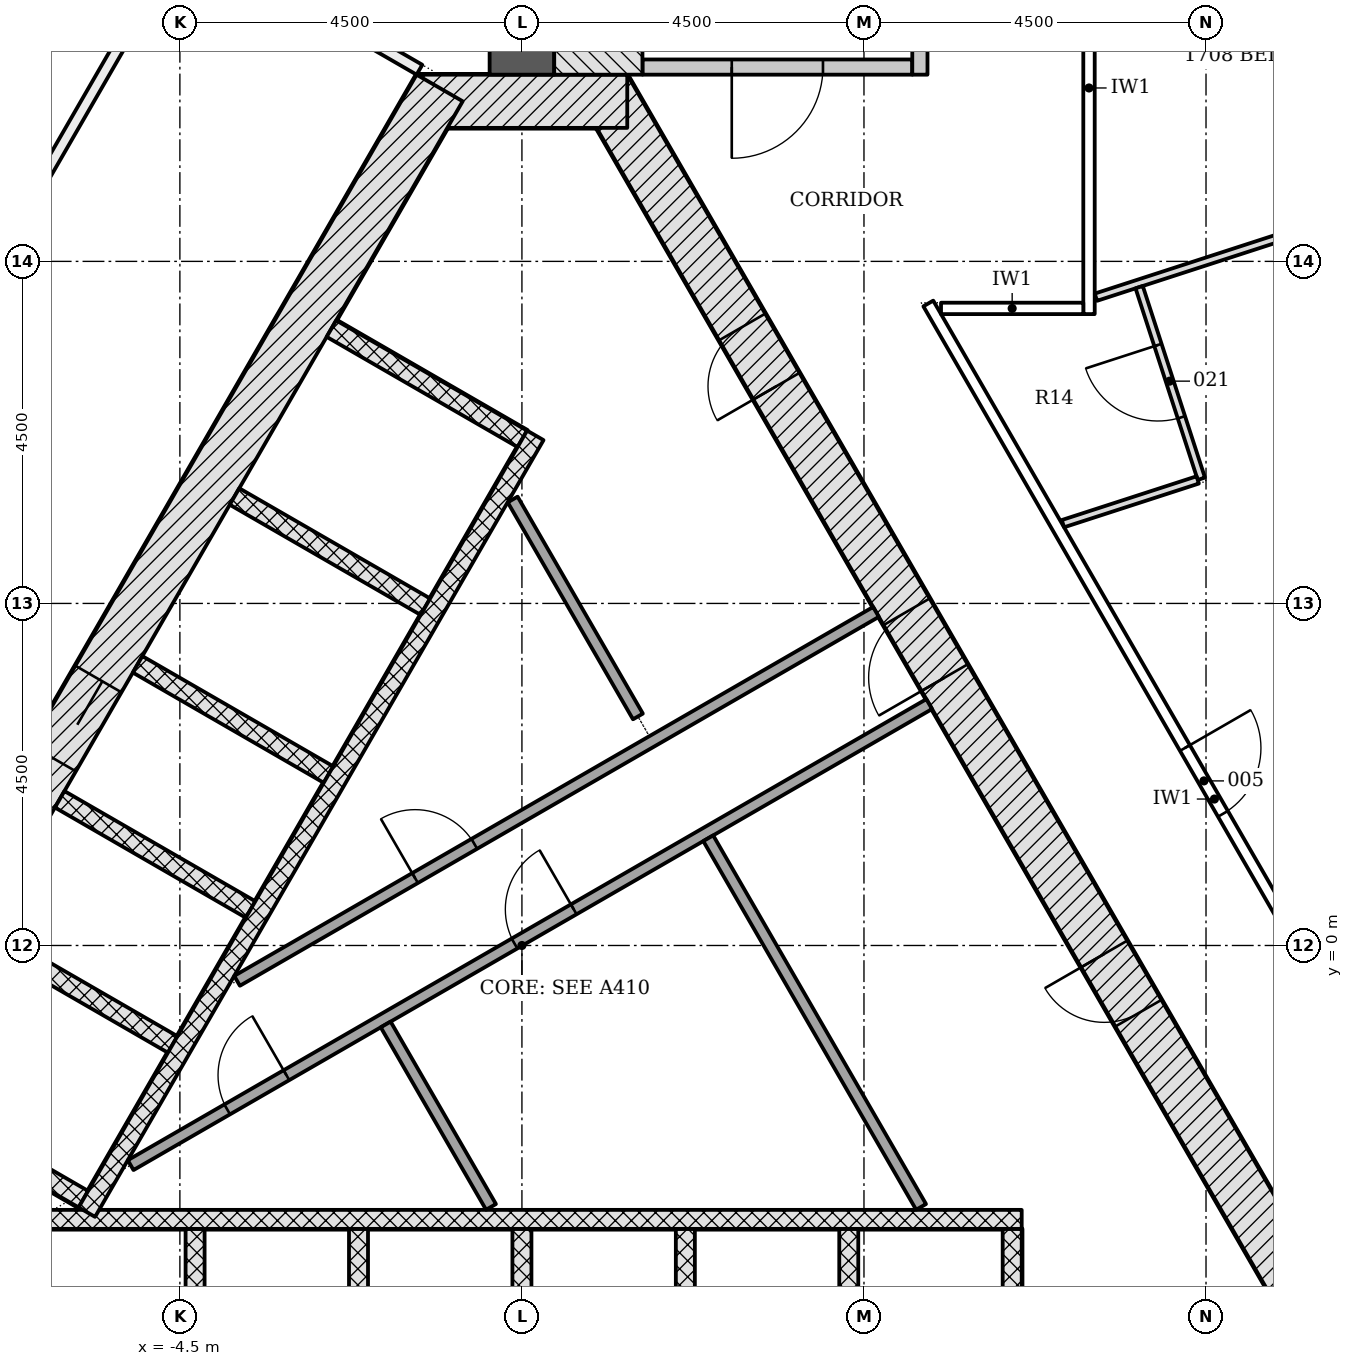
"""IFC4 building model, lengths in metres.
Left out: names, types, materials, properties, quantities, classifications, styles, units other than length and angle.
Written with IfcOpenShell. Run it as: python <this file> out.ifc"""

import sys

from ifc_helpers import new_model, si_unit, direction, frame, frame_2d, origin, place, context, subcontext, project, spatial, rectangle, extrude, element, fill, save


model = new_model("IFC4")
c1 = context("Model", 3, precision=1e-05, world=origin(), true_north=direction((0.0, 1.0)))
c2 = subcontext(c1, "Body", "Model", "MODEL_VIEW")
j1 = project(units=[si_unit("LENGTHUNIT", "METRE"), si_unit("PLANEANGLEUNIT", "RADIAN")], contexts=[c1])
p1 = place(None, origin())
s1 = spatial("IfcSite", under=j1, at=p1, CompositionType="ELEMENT")
p2 = place(p1, origin())
s2 = spatial("IfcBuilding", under=s1, at=p2, CompositionType="ELEMENT")
p3 = place(p2, frame((0.0, 0.0, 69.0)))
s3 = spatial("IfcBuildingStorey", under=s2, at=p3, CompositionType="ELEMENT", Elevation=69.0)
p4 = place(p3, frame((8.926, -6.753, -0.2), z_axis=(0.0, 0.0, 1.0), x_axis=(0.500042739161, 0.866000726912, 0.0)))
e1 = element("IfcWall", 1, at=p4, inside=s3, PredefinedType="SHEAR", context=c2, shape_type="SweptSolid", body=[
    extrude(rectangle(XDim=2.771, YDim=0.7, at=frame_2d((1.386, 0.0))), origin(), (0.0, 0.0, 1.0), 3.6),
])
p5 = place(p3, frame((10.311, -4.703, -0.2), z_axis=(0.0, 0.0, 1.0), x_axis=(-0.500001446645, 0.866024568562, 0.0)))
e2 = element("IfcWall", 2, at=p5, inside=s3, PredefinedType="SHEAR", context=c2, shape_type="SweptSolid", body=[
    extrude(rectangle(XDim=18.458, YDim=0.7, at=frame_2d((9.229, 0.0))), origin(), (0.0, 0.0, 1.0), 3.6),
])
p6 = place(p5, frame((9.5, 0.0, 0.2)))
e3 = element("IfcOpeningElement", 3, at=p6, cuts=e2, PredefinedType="OPENING", context=c2, shape_type="SweptSolid", body=[
    extrude(rectangle(XDim=1.0, YDim=2.1, at=frame_2d((0.5, 1.05))), frame((0.0, 0.36, 0.0), z_axis=(0.0, -1.0, 0.0), x_axis=(1.0, 0.0, 0.0)), (0.0, 0.0, 1.0), 0.72),
])
p7 = place(p5, frame((4.402, 0.0, 0.2)))
e4 = element("IfcOpeningElement", 4, at=p7, cuts=e2, PredefinedType="OPENING", context=c2, shape_type="SweptSolid", body=[
    extrude(rectangle(XDim=0.9, YDim=2.1, at=frame_2d((0.45, 1.05))), frame((0.0, 0.36, 0.0), z_axis=(0.0, -1.0, 0.0), x_axis=(1.0, 0.0, 0.0)), (0.0, 0.0, 1.0), 0.72),
])
p8 = place(p5, frame((13.927, 0.0, 0.2)))
e5 = element("IfcOpeningElement", 5, at=p8, cuts=e2, PredefinedType="OPENING", context=c2, shape_type="SweptSolid", body=[
    extrude(rectangle(XDim=0.9, YDim=2.1, at=frame_2d((0.45, 1.05))), frame((0.0, 0.36, 0.0), z_axis=(0.0, -1.0, 0.0), x_axis=(1.0, 0.0, 0.0)), (0.0, 0.0, 1.0), 0.72),
])
p9 = place(p3, frame((1.386, 11.106, -0.2), z_axis=(0.0, 0.0, 1.0), x_axis=(-1.0, 0.0, 0.0)))
e6 = element("IfcWall", 6, at=p9, inside=s3, PredefinedType="SHEAR", context=c2, shape_type="SweptSolid", body=[
    extrude(rectangle(XDim=2.771, YDim=0.7, at=frame_2d((1.386, 0.0))), origin(), (0.0, 0.0, 1.0), 3.6),
])
p10 = place(p3, frame((-1.083, 11.281, -0.2), z_axis=(0.0, 0.0, 1.0), x_axis=(-0.500001446645, -0.866024568562, 0.0)))
e7 = element("IfcWall", 7, at=p10, inside=s3, PredefinedType="SHEAR", context=c2, shape_type="SweptSolid", body=[
    extrude(rectangle(XDim=18.458, YDim=0.7, at=frame_2d((9.229, 0.0))), origin(), (0.0, 0.0, 1.0), 3.6),
])
p11 = place(p10, frame((8.979, 0.0, 0.2)))
e8 = element("IfcOpeningElement", 8, at=p11, cuts=e7, PredefinedType="OPENING", context=c2, shape_type="SweptSolid", body=[
    extrude(rectangle(XDim=1.2, YDim=2.1, at=frame_2d((0.6, 1.05))), frame((0.0, 0.36, 0.0), z_axis=(0.0, -1.0, 0.0), x_axis=(1.0, 0.0, 0.0)), (0.0, 0.0, 1.0), 0.72),
])
p12 = place(p10, frame((11.029, 0.0, 0.2)))
e9 = element("IfcOpeningElement", 9, at=p12, cuts=e7, PredefinedType="OPENING", context=c2, shape_type="SweptSolid", body=[
    extrude(rectangle(XDim=1.2, YDim=2.1, at=frame_2d((0.6, 1.05))), frame((0.0, 0.36, 0.0), z_axis=(0.0, -1.0, 0.0), x_axis=(1.0, 0.0, 0.0)), (0.0, 0.0, 1.0), 0.72),
])
p13 = place(p3, frame((0.0, 11.456, -0.2), z_axis=(0.0, 0.0, 1.0), x_axis=(0.0, 1.0, 0.0)))
e10 = element("IfcWall", 10, at=p13, inside=s3, PredefinedType="SHEAR", context=c2, shape_type="SweptSolid", body=[
    extrude(rectangle(XDim=13.382, YDim=0.85, at=frame_2d((6.691, 0.0))), origin(), (0.0, 0.0, 1.0), 3.6),
])
for number, where, z_axis, x_axis in (
    (11, (-4.3, -6.228, -0.2), (0.0, 0.0, 1.0), (0.0, 1.0, 0.0)),
    (12, (-2.15, -6.228, -0.2), (0.0, 0.0, 1.0), (0.0, 1.0, 0.0)),
    (13, (0.0, -6.228, -0.2), (0.0, 0.0, 1.0), (0.0, 1.0, 0.0)),
    (14, (2.15, -6.228, -0.2), (0.0, 0.0, 1.0), (0.0, 1.0, 0.0)),
    (15, (4.3, -6.228, -0.2), (0.0, 0.0, 1.0), (0.0, 1.0, 0.0)),
    (16, (6.45, -6.228, -0.2), (0.0, 0.0, 1.0), (0.0, 1.0, 0.0)),
):
    element("IfcWall", number, at=place(p3, frame(where, z_axis=z_axis, x_axis=x_axis)), inside=s3, PredefinedType="PARTITIONING", context=c2, shape_type="SweptSolid", body=[
        extrude(rectangle(XDim=2.5, YDim=0.25, at=frame_2d((1.25, 0.0))), origin(), (0.0, 0.0, 1.0), 3.6),
    ])
p14 = place(p3, frame((-6.575, -3.603, 0.0), z_axis=(0.0, 0.0, 1.0), x_axis=(1.0, 0.0, 0.0)))
e17 = element("IfcWall", 17, at=p14, inside=s3, PredefinedType="PARTITIONING", context=c2, shape_type="SweptSolid", body=[
    extrude(rectangle(XDim=13.15, YDim=0.25, at=frame_2d((6.575, 0.0))), origin(), (0.0, 0.0, 1.0), 3.4),
])
p15 = place(p3, frame((-2.506, 8.115, -0.2), z_axis=(0.0, 0.0, 1.0), x_axis=(0.865996321171, -0.50005036918, 0.0)))
e18 = element("IfcWall", 18, at=p15, inside=s3, PredefinedType="PARTITIONING", context=c2, shape_type="SweptSolid", body=[
    extrude(rectangle(XDim=2.9, YDim=0.25, at=frame_2d((1.45, 0.0))), origin(), (0.0, 0.0, 1.0), 3.6),
])
for number, where, z_axis, x_axis in (
    (19, (-3.781, 5.907, -0.2), (0.0, 0.0, 1.0), (0.866, -0.5, 0.0)),
    (20, (-5.056, 3.699, -0.2), (0.0, 0.0, 1.0), (0.866, -0.5, 0.0)),
    (21, (-6.081, 1.923, -0.2), (0.0, 0.0, 1.0), (0.866, -0.5, 0.0)),
    (22, (-7.106, 0.148, -0.2), (0.0, 0.0, 1.0), (0.866, -0.5, 0.0)),
    (23, (-8.281, -1.887, -0.2), (0.0, 0.0, 1.0), (0.866, -0.5, 0.0)),
):
    element("IfcWall", number, at=place(p3, frame(where, z_axis=z_axis, x_axis=x_axis)), inside=s3, PredefinedType="PARTITIONING", context=c2, shape_type="SweptSolid", body=[
        extrude(rectangle(XDim=2.9, YDim=0.25, at=frame_2d((1.45, 0.0))), origin(), (0.0, 0.0, 1.0), 3.6),
    ])
p16 = place(p3, frame((0.176, 6.711, 0.0), z_axis=(0.0, 0.0, 1.0), x_axis=(-0.500004227369, -0.866022963098, 0.0)))
e24 = element("IfcWall", 24, at=p16, inside=s3, PredefinedType="PARTITIONING", context=c2, shape_type="SweptSolid", body=[
    extrude(rectangle(XDim=11.8, YDim=0.25, at=frame_2d((5.9, 0.0))), origin(), (0.0, 0.0, 1.0), 3.4),
])
p17 = place(p3, frame((-5.148, -2.89, 0.0), z_axis=(0.0, 0.0, 1.0), x_axis=(0.866030081544, 0.499991897794, 0.0)))
e25 = element("IfcWall", 25, at=p17, inside=s3, PredefinedType="PARTITIONING", context=c2, shape_type="SweptSolid", body=[
    extrude(rectangle(XDim=12.131, YDim=0.15, at=frame_2d((6.065, 0.0))), origin(), (0.0, 0.0, 1.0), 3.4),
])
p18 = place(p17, frame((5.831, 0.0, 0.0)))
e26 = element("IfcOpeningElement", 26, at=p18, cuts=e25, PredefinedType="OPENING", context=c2, shape_type="SweptSolid", body=[
    extrude(rectangle(XDim=0.9, YDim=2.1, at=frame_2d((0.45, 1.05))), frame((0.0, 0.085, 0.0), z_axis=(0.0, -1.0, 0.0), x_axis=(1.0, 0.0, 0.0)), (0.0, 0.0, 1.0), 0.17),
])
p19 = place(p17, frame((1.467, 0.0, 0.0)))
e27 = element("IfcOpeningElement", 27, at=p19, cuts=e25, PredefinedType="OPENING", context=c2, shape_type="SweptSolid", body=[
    extrude(rectangle(XDim=0.9, YDim=2.1, at=frame_2d((0.45, 1.05))), frame((0.0, 0.085, 0.0), z_axis=(0.0, -1.0, 0.0), x_axis=(1.0, 0.0, 0.0)), (0.0, 0.0, 1.0), 0.17),
])
p20 = place(p3, frame((-3.748, -0.465, 0.0), z_axis=(0.0, 0.0, 1.0), x_axis=(0.866033540873, 0.499985905884, 0.0)))
e28 = element("IfcWall", 28, at=p20, inside=s3, PredefinedType="PARTITIONING", context=c2, shape_type="SweptSolid", body=[
    extrude(rectangle(XDim=9.706, YDim=0.15, at=frame_2d((4.853, 0.0))), origin(), (0.0, 0.0, 1.0), 3.4),
])
p21 = place(p20, frame((2.704, 0.0, 0.0)))
e29 = element("IfcOpeningElement", 29, at=p21, cuts=e28, PredefinedType="OPENING", context=c2, shape_type="SweptSolid", body=[
    extrude(rectangle(XDim=0.9, YDim=2.1, at=frame_2d((0.45, 1.05))), frame((0.0, 0.085, 0.0), z_axis=(0.0, -1.0, 0.0), x_axis=(1.0, 0.0, 0.0)), (0.0, 0.0, 1.0), 0.17),
])
p22 = place(p3, frame((1.526, 3.013, 0.0), z_axis=(0.0, 0.0, 1.0), x_axis=(-0.499978925887, 0.866037570588, 0.0)))
e30 = element("IfcWall", 30, at=p22, inside=s3, PredefinedType="PARTITIONING", context=c2, shape_type="SweptSolid", body=[
    extrude(rectangle(XDim=3.296, YDim=0.15, at=frame_2d((1.648, 0.0))), origin(), (0.0, 0.0, 1.0), 3.4),
])
p23 = place(p3, frame((-0.407, -3.439, 0.0), z_axis=(0.0, 0.0, 1.0), x_axis=(-0.500004591975, 0.86602275259, 0.0)))
e31 = element("IfcWall", 31, at=p23, inside=s3, PredefinedType="PARTITIONING", context=c2, shape_type="SweptSolid", body=[
    extrude(rectangle(XDim=2.771, YDim=0.15, at=frame_2d((1.386, 0.0))), origin(), (0.0, 0.0, 1.0), 3.4),
])
p24 = place(p3, frame((5.251, -3.439, 0.0), z_axis=(0.0, 0.0, 1.0), x_axis=(-0.500011755427, 0.866018616679, 0.0)))
e32 = element("IfcWall", 32, at=p24, inside=s3, PredefinedType="PARTITIONING", context=c2, shape_type="SweptSolid", body=[
    extrude(rectangle(XDim=5.6, YDim=0.15, at=frame_2d((2.8, 0.0))), origin(), (0.0, 0.0, 1.0), 3.4),
])
p25 = place(p3, frame((5.135, 11.556, -0.2), z_axis=(0.0, 0.0, 1.0), x_axis=(-1.0, 0.0, 0.0)))
e33 = element("IfcWall", 33, at=p25, inside=s3, PredefinedType="SHEAR", context=c2, shape_type="SweptSolid", body=[
    extrude(rectangle(XDim=3.55, YDim=0.2, at=frame_2d((1.775, 0.0))), origin(), (0.0, 0.0, 1.0), 3.6),
])
p26 = place(p25, frame((1.175, 0.0, 0.2)))
e34 = element("IfcOpeningElement", 34, at=p26, cuts=e33, PredefinedType="OPENING", context=c2, shape_type="SweptSolid", body=[
    extrude(rectangle(XDim=1.2, YDim=2.1, at=frame_2d((0.6, 1.05))), frame((0.0, 0.11, 0.0), z_axis=(0.0, -1.0, 0.0), x_axis=(1.0, 0.0, 0.0)), (0.0, 0.0, 1.0), 0.22),
])
p27 = place(p3, frame((5.236, 11.456, -0.2), z_axis=(0.0, 0.0, 1.0), x_axis=(0.0, 1.0, 0.0)))
e35 = element("IfcWall", 35, at=p27, inside=s3, PredefinedType="SHEAR", context=c2, shape_type="SweptSolid", body=[
    extrude(rectangle(XDim=5.6, YDim=0.2, at=frame_2d((2.8, 0.0))), origin(), (0.0, 0.0, 1.0), 3.6),
])
p28 = place(p27, frame((0.45, 0.0, 0.2)))
e36 = element("IfcOpeningElement", 36, at=p28, cuts=e35, PredefinedType="OPENING", context=c2, shape_type="SweptSolid", body=[
    extrude(rectangle(XDim=1.2, YDim=2.1, at=frame_2d((0.6, 1.05))), frame((0.0, 0.11, 0.0), z_axis=(0.0, -1.0, 0.0), x_axis=(1.0, 0.0, 0.0)), (0.0, 0.0, 1.0), 0.22),
])
p29 = place(p3, frame((1.005, 11.456, -0.2), z_axis=(0.0, 0.0, 1.0), x_axis=(0.0, 1.0, 0.0)))
e37 = element("IfcWall", 37, at=p29, inside=s3, PredefinedType="SHEAR", context=c2, shape_type="SweptSolid", body=[
    extrude(rectangle(XDim=7.2, YDim=1.161, at=frame_2d((3.6, 0.0))), origin(), (0.0, 0.0, 1.0), 3.6),
])
p30 = place(p3, frame((-16.256, -3.149, 0.0), z_axis=(0.0, 0.0, 1.0), x_axis=(0.499999683919, 0.866025586274, 0.0)))
e38 = element("IfcWall", 38, at=p30, inside=s3, PredefinedType="PARTITIONING", context=c2, shape_type="SweptSolid", body=[
    extrude(rectangle(XDim=22.234, YDim=0.15, at=frame_2d((11.117, 0.0))), origin(), (0.0, 0.0, 1.0), 2.778),
])
p31 = place(p30, frame((13.551, 0.0, 0.0)))
e39 = element("IfcOpeningElement", 39, at=p31, cuts=e38, PredefinedType="OPENING", context=c2, shape_type="SweptSolid", body=[
    extrude(rectangle(XDim=1.0, YDim=2.1, at=frame_2d((0.5, 1.05))), frame((0.0, 0.085, 0.0), z_axis=(0.0, -1.0, 0.0), x_axis=(1.0, 0.0, 0.0)), (0.0, 0.0, 1.0), 0.17),
])
p32 = place(p30, frame((5.647, 0.0, 0.0)))
e40 = element("IfcOpeningElement", 40, at=p32, cuts=e38, PredefinedType="OPENING", context=c2, shape_type="SweptSolid", body=[
    extrude(rectangle(XDim=1.5, YDim=2.1, at=frame_2d((0.75, 1.05))), frame((0.0, 0.085, 0.0), z_axis=(0.0, -1.0, 0.0), x_axis=(1.0, 0.0, 0.0)), (0.0, 0.0, 1.0), 0.17),
])
p33 = place(p3, frame((-4.407, 13.374, 0.0), z_axis=(0.0, 0.0, 1.0), x_axis=(-0.499997181693, -0.866027030928, 0.0)))
e41 = element("IfcWall", 41, at=p33, inside=s3, PredefinedType="PARTITIONING", context=c2, shape_type="SweptSolid", body=[
    extrude(rectangle(XDim=16.77, YDim=0.15, at=frame_2d((8.385, 0.0))), origin(), (0.0, 0.0, 1.0), 2.778),
])
p34 = place(p33, frame((8.879, 0.0, 0.0)))
e42 = element("IfcOpeningElement", 42, at=p34, cuts=e41, PredefinedType="OPENING", context=c2, shape_type="SweptSolid", body=[
    extrude(rectangle(XDim=1.0, YDim=2.1, at=frame_2d((0.5, 1.05))), frame((0.0, 0.085, 0.0), z_axis=(0.0, -1.0, 0.0), x_axis=(1.0, 0.0, 0.0)), (0.0, 0.0, 1.0), 0.17),
])
p35 = place(p3, frame((5.346, 8.446, 0.0), z_axis=(0.0, 0.0, 1.0), x_axis=(0.500008781656, -0.866020333634, 0.0)))
e43 = element("IfcWall", 43, at=p35, inside=s3, PredefinedType="PARTITIONING", context=c2, shape_type="SweptSolid", body=[
    extrude(rectangle(XDim=15.057, YDim=0.15, at=frame_2d((7.528, 0.0))), origin(), (0.0, 0.0, 1.0), 2.778),
])
p36 = place(p35, frame((12.55, 0.0, 0.0)))
e44 = element("IfcOpeningElement", 44, at=p36, cuts=e43, PredefinedType="OPENING", context=c2, shape_type="SweptSolid", body=[
    extrude(rectangle(XDim=1.0, YDim=2.1, at=frame_2d((0.5, 1.05))), frame((0.0, 0.085, 0.0), z_axis=(0.0, -1.0, 0.0), x_axis=(1.0, 0.0, 0.0)), (0.0, 0.0, 1.0), 0.17),
])
p37 = place(p35, frame((6.753, 0.0, 0.0)))
e45 = element("IfcOpeningElement", 45, at=p37, cuts=e43, PredefinedType="OPENING", context=c2, shape_type="SweptSolid", body=[
    extrude(rectangle(XDim=1.0, YDim=2.1, at=frame_2d((0.5, 1.05))), frame((0.0, 0.085, 0.0), z_axis=(0.0, -1.0, 0.0), x_axis=(1.0, 0.0, 0.0)), (0.0, 0.0, 1.0), 0.17),
])
p38 = place(p3, frame((7.461, 8.306, 0.0), z_axis=(0.0, 0.0, 1.0), x_axis=(0.0, 1.0, 0.0)))
e46 = element("IfcWall", 46, at=p38, inside=s3, PredefinedType="PARTITIONING", context=c2, shape_type="SweptSolid", body=[
    extrude(rectangle(XDim=5.95, YDim=0.15, at=frame_2d((2.975, 0.0))), origin(), (0.0, 0.0, 1.0), 2.778),
])
p39 = place(p3, frame((-4.379, 13.271, 0.0), z_axis=(0.0, 0.0, 1.0), x_axis=(0.866019471182, -0.500010275428, 0.0)))
e47 = element("IfcWall", 47, at=p39, inside=s3, PredefinedType="PARTITIONING", context=c2, shape_type="SweptSolid", body=[
    extrude(rectangle(XDim=3.5, YDim=0.15, at=frame_2d((1.75, 0.0))), origin(), (0.0, 0.0, 1.0), 3.4),
])
p40 = place(p3, frame((5.514, 8.381, 0.0), z_axis=(0.0, 0.0, 1.0), x_axis=(1.0, 0.0, 0.0)))
e48 = element("IfcWall", 48, at=p40, inside=s3, PredefinedType="PARTITIONING", context=c2, shape_type="SweptSolid", body=[
    extrude(rectangle(XDim=1.872, YDim=0.15, at=frame_2d((0.936, 0.0))), origin(), (0.0, 0.0, 1.0), 3.4),
])
p41 = place(p3, frame((7.551, 8.529, 0.0), z_axis=(0.0, 0.0, 1.0), x_axis=(0.951171490306, 0.308662916511, 0.0)))
e49 = element("IfcWall", 49, at=p41, inside=s3, PredefinedType="PARTITIONING", context=c2, shape_type="SweptSolid", body=[
    extrude(rectangle(XDim=6.302, YDim=0.1, at=frame_2d((3.151, 0.0))), origin(), (0.0, 0.0, 1.0), 2.778),
])
p42 = place(p41, frame((2.936, 0.0, 0.0)))
e50 = element("IfcOpeningElement", 50, at=p42, cuts=e49, PredefinedType="OPENING", context=c2, shape_type="SweptSolid", body=[
    extrude(rectangle(XDim=1.0, YDim=2.1, at=frame_2d((0.5, 1.05))), frame((0.0, 0.06, 0.0), z_axis=(0.0, -1.0, 0.0), x_axis=(1.0, 0.0, 0.0)), (0.0, 0.0, 1.0), 0.12),
])
p43 = place(p3, frame((8.938, 6.14, 0.0), z_axis=(0.0, 0.0, 1.0), x_axis=(-0.308644385593, 0.951177503541, 0.0)))
e51 = element("IfcWall", 51, at=p43, inside=s3, PredefinedType="PARTITIONING", context=c2, shape_type="SweptSolid", body=[
    extrude(rectangle(XDim=2.65, YDim=0.1, at=frame_2d((1.325, 0.0))), origin(), (0.0, 0.0, 1.0), 2.778),
])
p44 = place(p43, frame((0.85, 0.0, 0.0)))
e52 = element("IfcOpeningElement", 52, at=p44, cuts=e51, PredefinedType="OPENING", context=c2, shape_type="SweptSolid", body=[
    extrude(rectangle(XDim=1.0, YDim=2.1, at=frame_2d((0.5, 1.05))), frame((0.0, 0.06, 0.0), z_axis=(0.0, -1.0, 0.0), x_axis=(1.0, 0.0, 0.0)), (0.0, 0.0, 1.0), 0.12),
])
p45 = place(p3, frame((7.117, 5.549, 0.0), z_axis=(0.0, 0.0, 1.0), x_axis=(0.951141782181, 0.308754449667, 0.0)))
e53 = element("IfcWall", 53, at=p45, inside=s3, PredefinedType="PARTITIONING", context=c2, shape_type="SweptSolid", body=[
    extrude(rectangle(XDim=1.865, YDim=0.1, at=frame_2d((0.932, 0.0))), origin(), (0.0, 0.0, 1.0), 3.4),
])
p46 = place(p11, origin())
e54 = element("IfcDoor", 54, at=p46, inside=s3, OperationType="DOUBLE_DOOR_SLIDING", PredefinedType="DOOR", context=c2, shape_type="SweptSolid", body=[
    extrude(rectangle(XDim=1.2, YDim=2.1, at=frame_2d((0.6, 1.05))), frame((0.0, 0.025, 0.0), z_axis=(0.0, -1.0, 0.0), x_axis=(1.0, 0.0, 0.0)), (0.0, 0.0, 1.0), 0.05),
])
fill(e8, e54)
p47 = place(p6, origin())
e55 = element("IfcDoor", 55, at=p47, inside=s3, OperationType="SINGLE_SWING_LEFT", PredefinedType="DOOR", context=c2, shape_type="SweptSolid", body=[
    extrude(rectangle(XDim=1.0, YDim=2.1, at=frame_2d((0.5, 1.05))), frame((0.0, 0.075, 0.0), z_axis=(0.0, -1.0, 0.0), x_axis=(1.0, 0.0, 0.0)), (0.0, 0.0, 1.0), 0.15),
])
fill(e3, e55)
p48 = place(p7, origin())
e56 = element("IfcDoor", 56, at=p48, inside=s3, OperationType="SINGLE_SWING_RIGHT", PredefinedType="DOOR", context=c2, shape_type="SweptSolid", body=[
    extrude(rectangle(XDim=0.9, YDim=2.1, at=frame_2d((0.45, 1.05))), frame((0.0, 0.075, 0.0), z_axis=(0.0, -1.0, 0.0), x_axis=(1.0, 0.0, 0.0)), (0.0, 0.0, 1.0), 0.15),
])
fill(e4, e56)
p49 = place(p8, origin())
e57 = element("IfcDoor", 57, at=p49, inside=s3, OperationType="SINGLE_SWING_LEFT", PredefinedType="DOOR", context=c2, shape_type="SweptSolid", body=[
    extrude(rectangle(XDim=0.9, YDim=2.1, at=frame_2d((0.45, 1.05))), frame((0.0, 0.075, 0.0), z_axis=(0.0, -1.0, 0.0), x_axis=(1.0, 0.0, 0.0)), (0.0, 0.0, 1.0), 0.15),
])
fill(e5, e57)
p50 = place(p18, origin())
e58 = element("IfcDoor", 58, at=p50, inside=s3, OperationType="SINGLE_SWING_RIGHT", PredefinedType="DOOR", context=c2, shape_type="SweptSolid", body=[
    extrude(rectangle(XDim=0.9, YDim=2.1, at=frame_2d((0.45, 1.05))), frame((0.0, 0.025, 0.0), z_axis=(0.0, -1.0, 0.0), x_axis=(1.0, 0.0, 0.0)), (0.0, 0.0, 1.0), 0.05),
])
fill(e26, e58)
p51 = place(p21, origin())
e59 = element("IfcDoor", 59, at=p51, inside=s3, OperationType="SINGLE_SWING_LEFT", PredefinedType="DOOR", context=c2, shape_type="SweptSolid", body=[
    extrude(rectangle(XDim=0.9, YDim=2.1, at=frame_2d((0.45, 1.05))), frame((0.0, 0.025, 0.0), z_axis=(0.0, -1.0, 0.0), x_axis=(1.0, 0.0, 0.0)), (0.0, 0.0, 1.0), 0.05),
])
fill(e29, e59)
p52 = place(p19, origin())
e60 = element("IfcDoor", 60, at=p52, inside=s3, OperationType="SINGLE_SWING_RIGHT", PredefinedType="DOOR", context=c2, shape_type="SweptSolid", body=[
    extrude(rectangle(XDim=0.9, YDim=2.1, at=frame_2d((0.45, 1.05))), frame((0.0, 0.025, 0.0), z_axis=(0.0, -1.0, 0.0), x_axis=(1.0, 0.0, 0.0)), (0.0, 0.0, 1.0), 0.05),
])
fill(e27, e60)
p53 = place(p26, origin())
e61 = element("IfcDoor", 61, at=p53, inside=s3, OperationType="SINGLE_SWING_RIGHT", PredefinedType="DOOR", context=c2, shape_type="SweptSolid", body=[
    extrude(rectangle(XDim=1.2, YDim=2.1, at=frame_2d((0.6, 1.05))), frame((0.0, 0.025, 0.0), z_axis=(0.0, -1.0, 0.0), x_axis=(1.0, 0.0, 0.0)), (0.0, 0.0, 1.0), 0.05),
])
fill(e34, e61)
p54 = place(p37, origin())
e62 = element("IfcDoor", 62, at=p54, inside=s3, OperationType="SINGLE_SWING_LEFT", PredefinedType="DOOR", context=c2, shape_type="SweptSolid", body=[
    extrude(rectangle(XDim=1.0, YDim=2.1, at=frame_2d((0.5, 1.05))), frame((0.0, 0.025, 0.0), z_axis=(0.0, -1.0, 0.0), x_axis=(1.0, 0.0, 0.0)), (0.0, 0.0, 1.0), 0.05),
])
fill(e45, e62)
p55 = place(p44, origin())
e63 = element("IfcDoor", 63, at=p55, inside=s3, OperationType="SINGLE_SWING_RIGHT", PredefinedType="DOOR", context=c2, shape_type="SweptSolid", body=[
    extrude(rectangle(XDim=1.0, YDim=2.1, at=frame_2d((0.5, 1.05))), frame((0.0, 0.025, 0.0), z_axis=(0.0, -1.0, 0.0), x_axis=(1.0, 0.0, 0.0)), (0.0, 0.0, 1.0), 0.05),
])
fill(e52, e63)
save(model, sys.argv[1])
